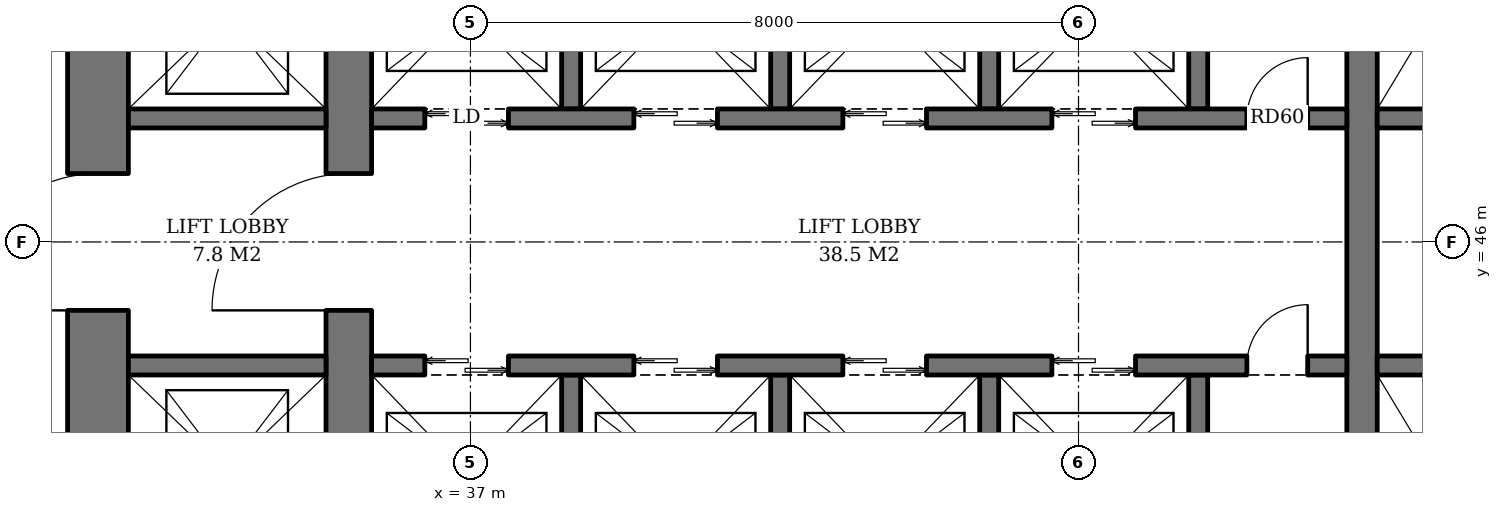
"""IFC4 building model, lengths in metres.
Left out: names, types, materials, properties, quantities, classifications, styles, units other than length and angle.
Written with IfcOpenShell. Run it as: python <this file> out.ifc"""

import sys

from ifc_helpers import new_model, si_unit, direction, frame, frame_2d, origin, place, context, subcontext, project, spatial, rectangle, extrude, element, fill, save


model = new_model("IFC4")
c1 = context("Model", 3, precision=1e-05, world=origin(), true_north=direction((0.0, 1.0)))
c2 = subcontext(c1, "Body", "Model", "MODEL_VIEW")
j1 = project(units=[si_unit("LENGTHUNIT", "METRE"), si_unit("PLANEANGLEUNIT", "RADIAN")], contexts=[c1])
p1 = place(None, origin())
s1 = spatial("IfcSite", under=j1, at=p1, CompositionType="ELEMENT")
p2 = place(p1, origin())
s2 = spatial("IfcBuilding", under=s1, at=p2, CompositionType="ELEMENT")
p3 = place(p2, frame((0.0, 0.0, 28.6)))
s3 = spatial("IfcBuildingStorey", under=s2, at=p3, CompositionType="ELEMENT", Elevation=28.6)
p4 = place(p3, frame((35.4, 36.7, 0.0), z_axis=(0.0, 0.0, 1.0), x_axis=(0.0, 1.0, 0.0)))
e1 = element("IfcWall", 1, at=p4, inside=s3, PredefinedType="SHEAR", context=c2, shape_type="SweptSolid", body=[
    extrude(rectangle(XDim=18.6, YDim=0.6, at=frame_2d((9.3, 0.0))), origin(), (0.0, 0.0, 1.0), 3.8),
])
p5 = place(p4, frame((8.4, 0.0, 0.0)))
e2 = element("IfcOpeningElement", 2, at=p5, cuts=e1, PredefinedType="OPENING", context=c2, shape_type="SweptSolid", body=[
    extrude(rectangle(XDim=1.8, YDim=2.4, at=frame_2d((0.9, 1.2))), frame((0.0, 0.31, 0.0), z_axis=(0.0, -1.0, 0.0), x_axis=(1.0, 0.0, 0.0)), (0.0, 0.0, 1.0), 0.62),
])
p6 = place(p3, frame((32.1, 33.5, 0.0), z_axis=(0.0, 0.0, 1.0), x_axis=(0.0, 1.0, 0.0)))
e3 = element("IfcWall", 3, at=p6, inside=s3, PredefinedType="SHEAR", context=c2, shape_type="SweptSolid", body=[
    extrude(rectangle(XDim=25.0, YDim=0.8, at=frame_2d((12.5, 0.0))), origin(), (0.0, 0.0, 1.0), 3.8),
])
p7 = place(p6, frame((11.6, 0.0, 0.0)))
e4 = element("IfcOpeningElement", 4, at=p7, cuts=e3, PredefinedType="OPENING", context=c2, shape_type="SweptSolid", body=[
    extrude(rectangle(XDim=1.8, YDim=2.4, at=frame_2d((0.9, 1.2))), frame((0.0, 0.41, 0.0), z_axis=(0.0, -1.0, 0.0), x_axis=(1.0, 0.0, 0.0)), (0.0, 0.0, 1.0), 0.82),
])
p8 = place(p3, frame((48.73, 40.0, 0.0), z_axis=(0.0, 0.0, 1.0), x_axis=(0.0, 1.0, 0.0)))
e5 = element("IfcWall", 5, at=p8, inside=s3, PredefinedType="SHEAR", context=c2, shape_type="SweptSolid", body=[
    extrude(rectangle(XDim=12.0, YDim=0.4, at=frame_2d((6.0, 0.0))), origin(), (0.0, 0.0, 1.0), 3.8),
])
for number, where, z_axis, x_axis in (
    (6, (38.325, 47.75, 0.0), (0.0, 0.0, 1.0), (0.0, 1.0, 0.0)),
    (7, (41.075, 47.75, 0.0), (0.0, 0.0, 1.0), (0.0, 1.0, 0.0)),
    (8, (43.825, 47.75, 0.0), (0.0, 0.0, 1.0), (0.0, 1.0, 0.0)),
    (9, (46.575, 47.75, 0.0), (0.0, 0.0, 1.0), (0.0, 1.0, 0.0)),
):
    element("IfcWall", number, at=place(p3, frame(where, z_axis=z_axis, x_axis=x_axis)), inside=s3, PredefinedType="SHEAR", context=c2, shape_type="SweptSolid", body=[
        extrude(rectangle(XDim=2.6, YDim=0.25, at=frame_2d((1.3, 0.0))), origin(), (0.0, 0.0, 1.0), 3.8),
    ])
p9 = place(p3, frame((35.7, 47.625, 0.0), z_axis=(0.0, 0.0, 1.0), x_axis=(1.0, 0.0, 0.0)))
e10 = element("IfcWall", 10, at=p9, inside=s3, PredefinedType="SHEAR", context=c2, shape_type="SweptSolid", body=[
    extrude(rectangle(XDim=12.83, YDim=0.25, at=frame_2d((6.415, 0.0))), origin(), (0.0, 0.0, 1.0), 3.8),
])
p10 = place(p9, frame((0.7, 0.0, 0.0)))
e11 = element("IfcOpeningElement", 11, at=p10, cuts=e10, PredefinedType="OPENING", context=c2, shape_type="SweptSolid", body=[
    extrude(rectangle(XDim=1.1, YDim=2.2, at=frame_2d((0.55, 1.1))), frame((0.0, 0.135, 0.0), z_axis=(0.0, -1.0, 0.0), x_axis=(1.0, 0.0, 0.0)), (0.0, 0.0, 1.0), 0.27),
])
p11 = place(p9, frame((3.45, 0.0, 0.0)))
e12 = element("IfcOpeningElement", 12, at=p11, cuts=e10, PredefinedType="OPENING", context=c2, shape_type="SweptSolid", body=[
    extrude(rectangle(XDim=1.1, YDim=2.2, at=frame_2d((0.55, 1.1))), frame((0.0, 0.135, 0.0), z_axis=(0.0, -1.0, 0.0), x_axis=(1.0, 0.0, 0.0)), (0.0, 0.0, 1.0), 0.27),
])
p12 = place(p9, frame((6.2, 0.0, 0.0)))
e13 = element("IfcOpeningElement", 13, at=p12, cuts=e10, PredefinedType="OPENING", context=c2, shape_type="SweptSolid", body=[
    extrude(rectangle(XDim=1.1, YDim=2.2, at=frame_2d((0.55, 1.1))), frame((0.0, 0.135, 0.0), z_axis=(0.0, -1.0, 0.0), x_axis=(1.0, 0.0, 0.0)), (0.0, 0.0, 1.0), 0.27),
])
p13 = place(p9, frame((8.95, 0.0, 0.0)))
e14 = element("IfcOpeningElement", 14, at=p13, cuts=e10, PredefinedType="OPENING", context=c2, shape_type="SweptSolid", body=[
    extrude(rectangle(XDim=1.1, YDim=2.2, at=frame_2d((0.55, 1.1))), frame((0.0, 0.135, 0.0), z_axis=(0.0, -1.0, 0.0), x_axis=(1.0, 0.0, 0.0)), (0.0, 0.0, 1.0), 0.27),
])
p14 = place(p9, frame((11.515, 0.0, 0.0)))
e15 = element("IfcOpeningElement", 15, at=p14, cuts=e10, PredefinedType="OPENING", context=c2, shape_type="SweptSolid", body=[
    extrude(rectangle(XDim=0.8, YDim=2.0, at=frame_2d((0.4, 1.0))), frame((0.0, 0.135, 0.0), z_axis=(0.0, -1.0, 0.0), x_axis=(1.0, 0.0, 0.0)), (0.0, 0.0, 1.0), 0.27),
])
for number, where, z_axis, x_axis in (
    (16, (38.325, 44.25, 0.0), (0.0, 0.0, 1.0), (0.0, -1.0, 0.0)),
    (17, (41.075, 44.25, 0.0), (0.0, 0.0, 1.0), (0.0, -1.0, 0.0)),
    (18, (43.825, 44.25, 0.0), (0.0, 0.0, 1.0), (0.0, -1.0, 0.0)),
    (19, (46.575, 44.25, 0.0), (0.0, 0.0, 1.0), (0.0, -1.0, 0.0)),
):
    element("IfcWall", number, at=place(p3, frame(where, z_axis=z_axis, x_axis=x_axis)), inside=s3, PredefinedType="SHEAR", context=c2, shape_type="SweptSolid", body=[
        extrude(rectangle(XDim=2.6, YDim=0.25, at=frame_2d((1.3, 0.0))), origin(), (0.0, 0.0, 1.0), 3.8),
    ])
p15 = place(p3, frame((35.7, 44.375, 0.0), z_axis=(0.0, 0.0, 1.0), x_axis=(1.0, 0.0, 0.0)))
e20 = element("IfcWall", 20, at=p15, inside=s3, PredefinedType="SHEAR", context=c2, shape_type="SweptSolid", body=[
    extrude(rectangle(XDim=12.83, YDim=0.25, at=frame_2d((6.415, 0.0))), origin(), (0.0, 0.0, 1.0), 3.8),
])
p16 = place(p15, frame((0.7, 0.0, 0.0)))
e21 = element("IfcOpeningElement", 21, at=p16, cuts=e20, PredefinedType="OPENING", context=c2, shape_type="SweptSolid", body=[
    extrude(rectangle(XDim=1.1, YDim=2.2, at=frame_2d((0.55, 1.1))), frame((0.0, 0.135, 0.0), z_axis=(0.0, -1.0, 0.0), x_axis=(1.0, 0.0, 0.0)), (0.0, 0.0, 1.0), 0.27),
])
p17 = place(p15, frame((3.45, 0.0, 0.0)))
e22 = element("IfcOpeningElement", 22, at=p17, cuts=e20, PredefinedType="OPENING", context=c2, shape_type="SweptSolid", body=[
    extrude(rectangle(XDim=1.1, YDim=2.2, at=frame_2d((0.55, 1.1))), frame((0.0, 0.135, 0.0), z_axis=(0.0, -1.0, 0.0), x_axis=(1.0, 0.0, 0.0)), (0.0, 0.0, 1.0), 0.27),
])
p18 = place(p15, frame((6.2, 0.0, 0.0)))
e23 = element("IfcOpeningElement", 23, at=p18, cuts=e20, PredefinedType="OPENING", context=c2, shape_type="SweptSolid", body=[
    extrude(rectangle(XDim=1.1, YDim=2.2, at=frame_2d((0.55, 1.1))), frame((0.0, 0.135, 0.0), z_axis=(0.0, -1.0, 0.0), x_axis=(1.0, 0.0, 0.0)), (0.0, 0.0, 1.0), 0.27),
])
p19 = place(p15, frame((8.95, 0.0, 0.0)))
e24 = element("IfcOpeningElement", 24, at=p19, cuts=e20, PredefinedType="OPENING", context=c2, shape_type="SweptSolid", body=[
    extrude(rectangle(XDim=1.1, YDim=2.2, at=frame_2d((0.55, 1.1))), frame((0.0, 0.135, 0.0), z_axis=(0.0, -1.0, 0.0), x_axis=(1.0, 0.0, 0.0)), (0.0, 0.0, 1.0), 0.27),
])
p20 = place(p15, frame((11.515, 0.0, 0.0)))
e25 = element("IfcOpeningElement", 25, at=p20, cuts=e20, PredefinedType="OPENING", context=c2, shape_type="SweptSolid", body=[
    extrude(rectangle(XDim=0.8, YDim=2.0, at=frame_2d((0.4, 1.0))), frame((0.0, 0.135, 0.0), z_axis=(0.0, -1.0, 0.0), x_axis=(1.0, 0.0, 0.0)), (0.0, 0.0, 1.0), 0.27),
])
for number, where, z_axis, x_axis in (
    (26, (48.93, 47.625, 0.0), (0.0, 0.0, 1.0), (1.0, 0.0, 0.0)),
    (27, (48.93, 44.375, 0.0), (0.0, 0.0, 1.0), (1.0, 0.0, 0.0)),
):
    element("IfcWall", number, at=place(p3, frame(where, z_axis=z_axis, x_axis=x_axis)), inside=s3, PredefinedType="SHEAR", context=c2, shape_type="SweptSolid", body=[
        extrude(rectangle(XDim=5.37, YDim=0.25, at=frame_2d((2.685, 0.0))), origin(), (0.0, 0.0, 1.0), 3.8),
    ])
for number, where, z_axis, x_axis in (
    (28, (32.5, 44.375, 0.0), (0.0, 0.0, 1.0), (1.0, 0.0, 0.0)),
    (29, (32.5, 47.625, 0.0), (0.0, 0.0, 1.0), (1.0, 0.0, 0.0)),
):
    element("IfcWall", number, at=place(p3, frame(where, z_axis=z_axis, x_axis=x_axis)), inside=s3, PredefinedType="SHEAR", context=c2, shape_type="SweptSolid", body=[
        extrude(rectangle(XDim=2.6, YDim=0.25, at=frame_2d((1.3, 0.0))), origin(), (0.0, 0.0, 1.0), 3.8),
    ])
p21 = place(p10, origin())
e30 = element("IfcDoor", 30, at=p21, inside=s3, OperationType="DOUBLE_DOOR_SLIDING", PredefinedType="DOOR", context=c2, shape_type="SweptSolid", body=[
    extrude(rectangle(XDim=1.1, YDim=2.2, at=frame_2d((0.55, 1.1))), frame((0.0, 0.025, 0.0), z_axis=(0.0, -1.0, 0.0), x_axis=(1.0, 0.0, 0.0)), (0.0, 0.0, 1.0), 0.05),
])
fill(e11, e30)
p22 = place(p11, origin())
e31 = element("IfcDoor", 31, at=p22, inside=s3, OperationType="DOUBLE_DOOR_SLIDING", PredefinedType="DOOR", context=c2, shape_type="SweptSolid", body=[
    extrude(rectangle(XDim=1.1, YDim=2.2, at=frame_2d((0.55, 1.1))), frame((0.0, 0.025, 0.0), z_axis=(0.0, -1.0, 0.0), x_axis=(1.0, 0.0, 0.0)), (0.0, 0.0, 1.0), 0.05),
])
fill(e12, e31)
p23 = place(p12, origin())
e32 = element("IfcDoor", 32, at=p23, inside=s3, OperationType="DOUBLE_DOOR_SLIDING", PredefinedType="DOOR", context=c2, shape_type="SweptSolid", body=[
    extrude(rectangle(XDim=1.1, YDim=2.2, at=frame_2d((0.55, 1.1))), frame((0.0, 0.025, 0.0), z_axis=(0.0, -1.0, 0.0), x_axis=(1.0, 0.0, 0.0)), (0.0, 0.0, 1.0), 0.05),
])
fill(e13, e32)
p24 = place(p13, origin())
e33 = element("IfcDoor", 33, at=p24, inside=s3, OperationType="DOUBLE_DOOR_SLIDING", PredefinedType="DOOR", context=c2, shape_type="SweptSolid", body=[
    extrude(rectangle(XDim=1.1, YDim=2.2, at=frame_2d((0.55, 1.1))), frame((0.0, 0.025, 0.0), z_axis=(0.0, -1.0, 0.0), x_axis=(1.0, 0.0, 0.0)), (0.0, 0.0, 1.0), 0.05),
])
fill(e14, e33)
p25 = place(p14, origin())
e34 = element("IfcDoor", 34, at=p25, inside=s3, OperationType="SINGLE_SWING_RIGHT", PredefinedType="DOOR", context=c2, shape_type="SweptSolid", body=[
    extrude(rectangle(XDim=0.8, YDim=2.0, at=frame_2d((0.4, 1.0))), frame((0.0, 0.025, 0.0), z_axis=(0.0, -1.0, 0.0), x_axis=(1.0, 0.0, 0.0)), (0.0, 0.0, 1.0), 0.05),
])
fill(e15, e34)
p26 = place(p16, origin())
e35 = element("IfcDoor", 35, at=p26, inside=s3, OperationType="DOUBLE_DOOR_SLIDING", PredefinedType="DOOR", context=c2, shape_type="SweptSolid", body=[
    extrude(rectangle(XDim=1.1, YDim=2.2, at=frame_2d((0.55, 1.1))), frame((0.0, 0.025, 0.0), z_axis=(0.0, -1.0, 0.0), x_axis=(1.0, 0.0, 0.0)), (0.0, 0.0, 1.0), 0.05),
])
fill(e21, e35)
p27 = place(p17, origin())
e36 = element("IfcDoor", 36, at=p27, inside=s3, OperationType="DOUBLE_DOOR_SLIDING", PredefinedType="DOOR", context=c2, shape_type="SweptSolid", body=[
    extrude(rectangle(XDim=1.1, YDim=2.2, at=frame_2d((0.55, 1.1))), frame((0.0, 0.025, 0.0), z_axis=(0.0, -1.0, 0.0), x_axis=(1.0, 0.0, 0.0)), (0.0, 0.0, 1.0), 0.05),
])
fill(e22, e36)
p28 = place(p18, origin())
e37 = element("IfcDoor", 37, at=p28, inside=s3, OperationType="DOUBLE_DOOR_SLIDING", PredefinedType="DOOR", context=c2, shape_type="SweptSolid", body=[
    extrude(rectangle(XDim=1.1, YDim=2.2, at=frame_2d((0.55, 1.1))), frame((0.0, 0.025, 0.0), z_axis=(0.0, -1.0, 0.0), x_axis=(1.0, 0.0, 0.0)), (0.0, 0.0, 1.0), 0.05),
])
fill(e23, e37)
p29 = place(p19, origin())
e38 = element("IfcDoor", 38, at=p29, inside=s3, OperationType="DOUBLE_DOOR_SLIDING", PredefinedType="DOOR", context=c2, shape_type="SweptSolid", body=[
    extrude(rectangle(XDim=1.1, YDim=2.2, at=frame_2d((0.55, 1.1))), frame((0.0, 0.025, 0.0), z_axis=(0.0, -1.0, 0.0), x_axis=(1.0, 0.0, 0.0)), (0.0, 0.0, 1.0), 0.05),
])
fill(e24, e38)
p30 = place(p20, origin())
e39 = element("IfcDoor", 39, at=p30, inside=s3, OperationType="SINGLE_SWING_RIGHT", PredefinedType="DOOR", context=c2, shape_type="SweptSolid", body=[
    extrude(rectangle(XDim=0.8, YDim=2.0, at=frame_2d((0.4, 1.0))), frame((0.0, 0.025, 0.0), z_axis=(0.0, -1.0, 0.0), x_axis=(1.0, 0.0, 0.0)), (0.0, 0.0, 1.0), 0.05),
])
fill(e25, e39)
p31 = place(p5, origin())
e40 = element("IfcDoor", 40, at=p31, inside=s3, OperationType="DOUBLE_DOOR_SINGLE_SWING", PredefinedType="DOOR", context=c2, shape_type="SweptSolid", body=[
    extrude(rectangle(XDim=1.8, YDim=2.4, at=frame_2d((0.9, 1.2))), frame((0.0, 0.025, 0.0), z_axis=(0.0, -1.0, 0.0), x_axis=(1.0, 0.0, 0.0)), (0.0, 0.0, 1.0), 0.05),
])
fill(e2, e40)
p32 = place(p7, origin())
e41 = element("IfcDoor", 41, at=p32, inside=s3, OperationType="DOUBLE_DOOR_SINGLE_SWING", PredefinedType="DOOR", context=c2, shape_type="SweptSolid", body=[
    extrude(rectangle(XDim=1.8, YDim=2.4, at=frame_2d((0.9, 1.2))), frame((0.0, 0.025, 0.0), z_axis=(0.0, -1.0, 0.0), x_axis=(1.0, 0.0, 0.0)), (0.0, 0.0, 1.0), 0.05),
])
fill(e4, e41)
save(model, sys.argv[1])
